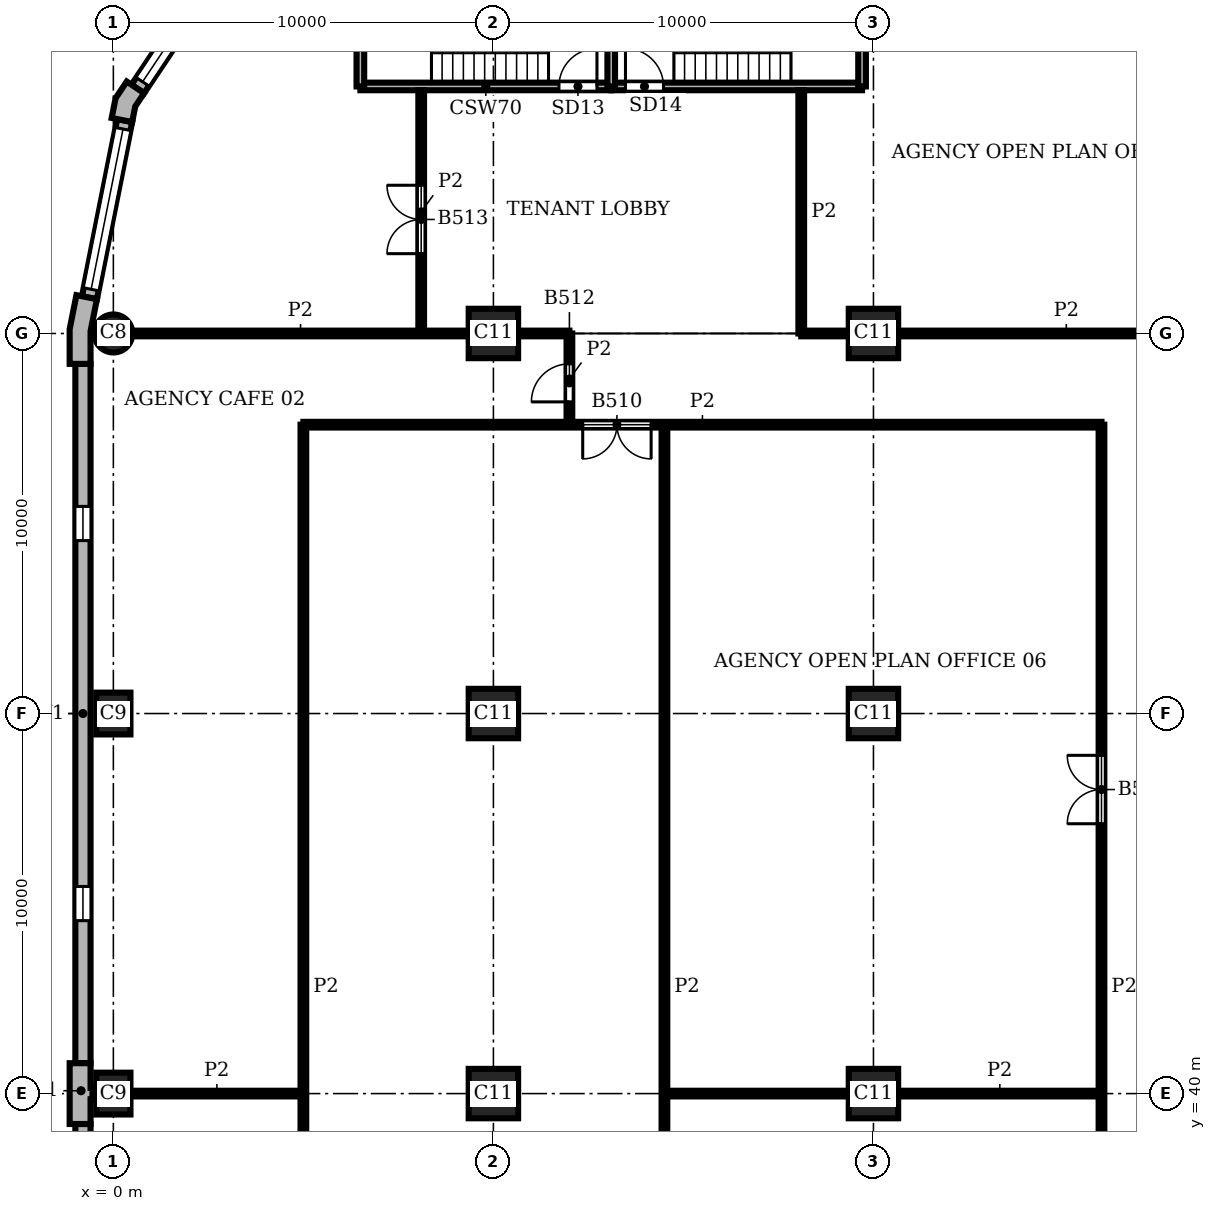
"""IFC4 building model, lengths in metres.
Left out: names, types, materials, properties, quantities, classifications, styles, units other than length and angle.
Written with IfcOpenShell. Run it as: python <this file> out.ifc"""

import sys

from ifc_helpers import new_model, si_unit, direction, frame, frame_2d, origin, origin_2d, place, context, subcontext, project, spatial, polyline, rectangle, circle, outline, extrude, element, fill, save


model = new_model("IFC4")
c1 = context("Model", 3, precision=1e-05, world=origin(), true_north=direction((0.0, 1.0)))
c2 = subcontext(c1, "Body", "Model", "MODEL_VIEW")
j1 = project(units=[si_unit("LENGTHUNIT", "METRE"), si_unit("PLANEANGLEUNIT", "RADIAN")], contexts=[c1])
p1 = place(None, origin())
s1 = spatial("IfcSite", under=j1, at=p1, CompositionType="ELEMENT")
p2 = place(p1, origin())
s2 = spatial("IfcBuilding", under=s1, at=p2, CompositionType="ELEMENT")
p3 = place(p2, frame((0.0, 0.0, 178.5)))
s3 = spatial("IfcBuildingStorey", under=s2, at=p3, CompositionType="ELEMENT", Elevation=178.5)
p4 = place(p3, frame((0.0, 60.0, 0.0), z_axis=(0.0, 0.0, 1.0), x_axis=(1.0, 0.0, 0.0)))
e1 = element("IfcColumn", 1, at=p4, inside=s3, PredefinedType="COLUMN", context=c2, shape_type="SweptSolid", body=[
    extrude(circle(Radius=0.5, at=origin_2d()), origin(), (0.0, 0.0, 1.0), 3.9),
])
for number, where, z_axis, x_axis in (
    (2, (0.0, 50.0, 0.0), (0.0, 0.0, 1.0), (0.0, 1.0, 0.0)),
    (3, (0.0, 40.0, 0.0), (0.0, 0.0, 1.0), (0.0, 1.0, 0.0)),
):
    element("IfcColumn", number, at=place(p3, frame(where, z_axis=z_axis, x_axis=x_axis)), inside=s3, PredefinedType="COLUMN", context=c2, shape_type="SweptSolid", body=[
        extrude(rectangle(XDim=1.1, YDim=0.9, at=origin_2d()), origin(), (0.0, 0.0, 1.0), 3.9),
    ])
for number, where, z_axis, x_axis in (
    (4, (10.0, 40.0, 0.0), (0.0, 0.0, 1.0), (1.0, 0.0, 0.0)),
    (5, (10.0, 50.0, 0.0), (0.0, 0.0, 1.0), (1.0, 0.0, 0.0)),
    (6, (10.0, 60.0, 0.0), (0.0, 0.0, 1.0), (1.0, 0.0, 0.0)),
    (7, (20.0, 40.0, 0.0), (0.0, 0.0, 1.0), (1.0, 0.0, 0.0)),
    (8, (20.0, 50.0, 0.0), (0.0, 0.0, 1.0), (1.0, 0.0, 0.0)),
    (9, (20.0, 60.0, 0.0), (0.0, 0.0, 1.0), (1.0, 0.0, 0.0)),
):
    element("IfcColumn", number, at=place(p3, frame(where, z_axis=z_axis, x_axis=x_axis)), inside=s3, PredefinedType="COLUMN", context=c2, shape_type="SweptSolid", body=[
        extrude(rectangle(XDim=1.3, YDim=1.3, at=origin_2d()), origin(), (0.0, 0.0, 1.0), 3.9),
    ])
p5 = place(p3, origin())
e10 = element("IfcWall", 10, at=p5, inside=s3, PredefinedType="SOLIDWALL", context=c2, shape_type="SweptSolid", body=[
    extrude(outline(polyline([(0.477, 66.545), (0.352, 66.629), (0.059, 66.189), (-0.045, 65.67), (0.103, 65.641), (0.495, 65.563), (0.577, 65.974), (0.81, 66.323), (0.477, 66.545)])), origin(), (0.0, 0.0, 1.0), 3.9),
])
e11 = element("IfcWall", 11, at=p5, inside=s3, PredefinedType="SOLIDWALL", context=c2, shape_type="SweptSolid", body=[
    extrude(outline(polyline([(-0.825, 60.98), (-0.972, 61.009), (-1.15, 60.113), (-1.15, 59.2), (-1.0, 59.2), (-0.6, 59.2), (-0.6, 60.059), (-0.432, 60.902), (-0.825, 60.98)])), origin(), (0.0, 0.0, 1.0), 3.9),
])
e12 = element("IfcWall", 12, at=p5, inside=s3, PredefinedType="SOLIDWALL", context=c2, shape_type="SweptSolid", body=[
    extrude(outline(polyline([(-0.6, 39.2), (-0.6, 39.85), (-0.55, 39.85), (-0.55, 40.15), (-0.6, 40.15), (-0.6, 40.8), (-1.0, 40.8), (-1.15, 40.8), (-1.15, 40.0), (-1.15, 39.2), (-1.0, 39.2), (-0.6, 39.2)])), origin(), (0.0, 0.0, 1.0), 3.9),
])
p6 = place(p3, frame((29.357, 66.434, 0.0), z_axis=(0.0, 0.0, 1.0), x_axis=(-0.555541552266, 0.831488775454, 0.0)))
e13 = element("IfcWall", 13, at=p6, inside=s3, PredefinedType="SOLIDWALL", context=c2, shape_type="SweptSolid", body=[
    extrude(rectangle(XDim=4.753, YDim=0.4, at=frame_2d((2.376, 0.0))), origin(), (0.0, 0.0, 1.0), 3.9),
])
p7 = place(p6, frame((0.226, 0.0, 0.9)))
e14 = element("IfcOpeningElement", 14, at=p7, cuts=e13, PredefinedType="OPENING", context=c2, shape_type="SweptSolid", body=[
    extrude(rectangle(XDim=4.3, YDim=2.35, at=frame_2d((2.15, 1.175))), frame((0.0, 0.21, 0.0), z_axis=(0.0, -1.0, 0.0), x_axis=(1.0, 0.0, 0.0)), (0.0, 0.0, 1.0), 0.42),
])
p8 = place(p3, frame((3.284, 70.386, 0.0), z_axis=(0.0, 0.0, 1.0), x_axis=(-0.555541552266, -0.831488775454, 0.0)))
e15 = element("IfcWall", 15, at=p8, inside=s3, PredefinedType="SOLIDWALL", context=c2, shape_type="SweptSolid", body=[
    extrude(rectangle(XDim=4.753, YDim=0.4, at=frame_2d((2.376, 0.0))), origin(), (0.0, 0.0, 1.0), 3.9),
])
p9 = place(p8, frame((0.226, 0.0, 0.9)))
e16 = element("IfcOpeningElement", 16, at=p9, cuts=e15, PredefinedType="OPENING", context=c2, shape_type="SweptSolid", body=[
    extrude(rectangle(XDim=4.3, YDim=2.35, at=frame_2d((2.15, 1.175))), frame((0.0, 0.21, 0.0), z_axis=(0.0, -1.0, 0.0), x_axis=(1.0, 0.0, 0.0)), (0.0, 0.0, 1.0), 0.42),
])
p10 = place(p3, frame((0.299, 65.602, 0.0), z_axis=(0.0, 0.0, 1.0), x_axis=(-0.195098533057, -0.98078364709, 0.0)))
e17 = element("IfcWall", 17, at=p10, inside=s3, PredefinedType="SOLIDWALL", context=c2, shape_type="SweptSolid", body=[
    extrude(rectangle(XDim=4.753, YDim=0.4, at=frame_2d((2.376, 0.0))), origin(), (0.0, 0.0, 1.0), 3.9),
])
p11 = place(p10, frame((0.226, 0.0, 0.9)))
e18 = element("IfcOpeningElement", 18, at=p11, cuts=e17, PredefinedType="OPENING", context=c2, shape_type="SweptSolid", body=[
    extrude(rectangle(XDim=4.3, YDim=2.35, at=frame_2d((2.15, 1.175))), frame((0.0, 0.21, 0.0), z_axis=(0.0, -1.0, 0.0), x_axis=(1.0, 0.0, 0.0)), (0.0, 0.0, 1.0), 0.42),
])
p12 = place(p3, frame((-0.8, 59.2, 0.0), z_axis=(0.0, 0.0, 1.0), x_axis=(0.0, -1.0, 0.0)))
e19 = element("IfcWall", 19, at=p12, inside=s3, PredefinedType="SOLIDWALL", context=c2, shape_type="SweptSolid", body=[
    extrude(rectangle(XDim=18.4, YDim=0.4, at=frame_2d((9.2, 0.0))), origin(), (0.0, 0.0, 1.0), 3.9),
])
p13 = place(p12, frame((3.75, 0.0, 0.9)))
e20 = element("IfcOpeningElement", 20, at=p13, cuts=e19, PredefinedType="OPENING", context=c2, shape_type="SweptSolid", body=[
    extrude(rectangle(XDim=0.9, YDim=2.35, at=frame_2d((0.45, 1.175))), frame((0.0, 0.21, 0.0), z_axis=(0.0, -1.0, 0.0), x_axis=(1.0, 0.0, 0.0)), (0.0, 0.0, 1.0), 0.42),
])
p14 = place(p12, frame((13.75, 0.0, 0.9)))
e21 = element("IfcOpeningElement", 21, at=p14, cuts=e19, PredefinedType="OPENING", context=c2, shape_type="SweptSolid", body=[
    extrude(rectangle(XDim=0.9, YDim=2.35, at=frame_2d((0.45, 1.175))), frame((0.0, 0.21, 0.0), z_axis=(0.0, -1.0, 0.0), x_axis=(1.0, 0.0, 0.0)), (0.0, 0.0, 1.0), 0.42),
])
p15 = place(p3, frame((-0.8, 39.2, 0.0), z_axis=(0.0, 0.0, 1.0), x_axis=(0.0, -1.0, 0.0)))
e22 = element("IfcWall", 22, at=p15, inside=s3, PredefinedType="SOLIDWALL", context=c2, shape_type="SweptSolid", body=[
    extrude(rectangle(XDim=18.4, YDim=0.4, at=frame_2d((9.2, 0.0))), origin(), (0.0, 0.0, 1.0), 3.9),
])
p16 = place(p15, frame((3.75, 0.0, 0.9)))
e23 = element("IfcOpeningElement", 23, at=p16, cuts=e22, PredefinedType="OPENING", context=c2, shape_type="SweptSolid", body=[
    extrude(rectangle(XDim=0.9, YDim=2.35, at=frame_2d((0.45, 1.175))), frame((0.0, 0.21, 0.0), z_axis=(0.0, -1.0, 0.0), x_axis=(1.0, 0.0, 0.0)), (0.0, 0.0, 1.0), 0.42),
])
p17 = place(p15, frame((13.75, 0.0, 0.9)))
e24 = element("IfcOpeningElement", 24, at=p17, cuts=e22, PredefinedType="OPENING", context=c2, shape_type="SweptSolid", body=[
    extrude(rectangle(XDim=0.9, YDim=2.35, at=frame_2d((0.45, 1.175))), frame((0.0, 0.21, 0.0), z_axis=(0.0, -1.0, 0.0), x_axis=(1.0, 0.0, 0.0)), (0.0, 0.0, 1.0), 0.42),
])
p18 = place(p3, frame((6.5, 66.5, 0.0), z_axis=(0.0, 0.0, 1.0), x_axis=(1.0, 0.0, 0.0)))
e25 = element("IfcWall", 25, at=p18, inside=s3, PredefinedType="SHEAR", context=c2, shape_type="SweptSolid", body=[
    extrude(rectangle(XDim=6.6, YDim=0.2, at=frame_2d((3.3, 0.0))), origin(), (0.0, 0.0, 1.0), 3.58),
])
p19 = place(p18, frame((5.225, 0.0, 0.0)))
e26 = element("IfcOpeningElement", 26, at=p19, cuts=e25, PredefinedType="OPENING", context=c2, shape_type="SweptSolid", body=[
    extrude(rectangle(XDim=1.0, YDim=2.1, at=frame_2d((0.5, 1.05))), frame((0.0, 0.11, 0.0), z_axis=(0.0, -1.0, 0.0), x_axis=(1.0, 0.0, 0.0)), (0.0, 0.0, 1.0), 0.22),
])
p20 = place(p3, frame((13.1, 66.5, 0.0), z_axis=(0.0, 0.0, 1.0), x_axis=(1.0, 0.0, 0.0)))
e27 = element("IfcWall", 27, at=p20, inside=s3, PredefinedType="SHEAR", context=c2, shape_type="SweptSolid", body=[
    extrude(rectangle(XDim=6.6, YDim=0.2, at=frame_2d((3.3, 0.0))), origin(), (0.0, 0.0, 1.0), 3.58),
])
p21 = place(p20, frame((0.375, 0.0, 0.0)))
e28 = element("IfcOpeningElement", 28, at=p21, cuts=e27, PredefinedType="OPENING", context=c2, shape_type="SweptSolid", body=[
    extrude(rectangle(XDim=1.0, YDim=2.1, at=frame_2d((0.5, 1.05))), frame((0.0, 0.11, 0.0), z_axis=(0.0, -1.0, 0.0), x_axis=(1.0, 0.0, 0.0)), (0.0, 0.0, 1.0), 0.22),
])
for number, where, z_axis, x_axis in (
    (29, (6.5, 66.5, 0.0), (0.0, 0.0, 1.0), (0.0, 1.0, 0.0)),
    (30, (13.1, 66.5, 0.0), (0.0, 0.0, 1.0), (0.0, 1.0, 0.0)),
    (31, (19.7, 66.5, 0.0), (0.0, 0.0, 1.0), (0.0, 1.0, 0.0)),
):
    element("IfcWall", number, at=place(p3, frame(where, z_axis=z_axis, x_axis=x_axis)), inside=s3, PredefinedType="SHEAR", context=c2, shape_type="SweptSolid", body=[
        extrude(rectangle(XDim=3.3, YDim=0.2, at=frame_2d((1.65, 0.0))), origin(), (0.0, 0.0, 1.0), 3.58),
    ])
p22 = place(p3, frame((5.0, 28.0, 0.0), z_axis=(0.0, 0.0, 1.0), x_axis=(0.0, 1.0, 0.0)))
e32 = element("IfcWall", 32, at=p22, inside=s3, PredefinedType="PARTITIONING", context=c2, shape_type="SweptSolid", body=[
    extrude(rectangle(XDim=29.6, YDim=0.15, at=frame_2d((14.8, 0.0))), origin(), (0.0, 0.0, 1.0), 3.58),
])
p23 = place(p3, frame((8.1, 60.0, 0.0), z_axis=(0.0, 0.0, 1.0), x_axis=(0.0, 1.0, 0.0)))
e33 = element("IfcWall", 33, at=p23, inside=s3, PredefinedType="PARTITIONING", context=c2, shape_type="SweptSolid", body=[
    extrude(rectangle(XDim=6.4, YDim=0.15, at=frame_2d((3.2, 0.0))), origin(), (0.0, 0.0, 1.0), 3.58),
])
p24 = place(p23, frame((2.1, 0.0, 0.0)))
e34 = element("IfcOpeningElement", 34, at=p24, cuts=e33, PredefinedType="OPENING", context=c2, shape_type="SweptSolid", body=[
    extrude(rectangle(XDim=1.8, YDim=2.1, at=frame_2d((0.9, 1.05))), frame((0.0, 0.085, 0.0), z_axis=(0.0, -1.0, 0.0), x_axis=(1.0, 0.0, 0.0)), (0.0, 0.0, 1.0), 0.17),
])
p25 = place(p3, frame((12.0, 57.6, 0.0), z_axis=(0.0, 0.0, 1.0), x_axis=(0.0, 1.0, 0.0)))
e35 = element("IfcWall", 35, at=p25, inside=s3, PredefinedType="PARTITIONING", context=c2, shape_type="SweptSolid", body=[
    extrude(rectangle(XDim=2.4, YDim=0.15, at=frame_2d((1.2, 0.0))), origin(), (0.0, 0.0, 1.0), 3.58),
])
p26 = place(p25, frame((0.6, 0.0, 0.0)))
e36 = element("IfcOpeningElement", 36, at=p26, cuts=e35, PredefinedType="OPENING", context=c2, shape_type="SweptSolid", body=[
    extrude(rectangle(XDim=1.0, YDim=2.1, at=frame_2d((0.5, 1.05))), frame((0.0, 0.085, 0.0), z_axis=(0.0, -1.0, 0.0), x_axis=(1.0, 0.0, 0.0)), (0.0, 0.0, 1.0), 0.17),
])
p27 = place(p3, frame((14.5, 28.0, 0.0), z_axis=(0.0, 0.0, 1.0), x_axis=(0.0, 1.0, 0.0)))
e37 = element("IfcWall", 37, at=p27, inside=s3, PredefinedType="PARTITIONING", context=c2, shape_type="SweptSolid", body=[
    extrude(rectangle(XDim=29.6, YDim=0.15, at=frame_2d((14.8, 0.0))), origin(), (0.0, 0.0, 1.0), 3.58),
])
p28 = place(p3, frame((18.1, 60.0, 0.0), z_axis=(0.0, 0.0, 1.0), x_axis=(0.0, 1.0, 0.0)))
e38 = element("IfcWall", 38, at=p28, inside=s3, PredefinedType="PARTITIONING", context=c2, shape_type="SweptSolid", body=[
    extrude(rectangle(XDim=6.4, YDim=0.15, at=frame_2d((3.2, 0.0))), origin(), (0.0, 0.0, 1.0), 3.58),
])
p29 = place(p3, frame((26.0, 28.0, 0.0), z_axis=(0.0, 0.0, 1.0), x_axis=(0.0, 1.0, 0.0)))
e39 = element("IfcWall", 39, at=p29, inside=s3, PredefinedType="PARTITIONING", context=c2, shape_type="SweptSolid", body=[
    extrude(rectangle(XDim=29.6, YDim=0.15, at=frame_2d((14.8, 0.0))), origin(), (0.0, 0.0, 1.0), 3.58),
])
p30 = place(p29, frame((6.1, 0.0, 0.0)))
e40 = element("IfcOpeningElement", 40, at=p30, cuts=e39, PredefinedType="OPENING", context=c2, shape_type="SweptSolid", body=[
    extrude(rectangle(XDim=1.0, YDim=2.1, at=frame_2d((0.5, 1.05))), frame((0.0, 0.085, 0.0), z_axis=(0.0, -1.0, 0.0), x_axis=(1.0, 0.0, 0.0)), (0.0, 0.0, 1.0), 0.17),
])
p31 = place(p29, frame((19.1, 0.0, 0.0)))
e41 = element("IfcOpeningElement", 41, at=p31, cuts=e39, PredefinedType="OPENING", context=c2, shape_type="SweptSolid", body=[
    extrude(rectangle(XDim=1.8, YDim=2.1, at=frame_2d((0.9, 1.05))), frame((0.0, 0.085, 0.0), z_axis=(0.0, -1.0, 0.0), x_axis=(1.0, 0.0, 0.0)), (0.0, 0.0, 1.0), 0.17),
])
p32 = place(p3, frame((0.45, 40.0, 0.0), z_axis=(0.0, 0.0, 1.0), x_axis=(1.0, 0.0, 0.0)))
e42 = element("IfcWall", 42, at=p32, inside=s3, PredefinedType="PARTITIONING", context=c2, shape_type="SweptSolid", body=[
    extrude(rectangle(XDim=4.55, YDim=0.15, at=frame_2d((2.275, 0.0))), origin(), (0.0, 0.0, 1.0), 3.58),
])
p33 = place(p3, frame((14.5, 40.0, 0.0), z_axis=(0.0, 0.0, 1.0), x_axis=(1.0, 0.0, 0.0)))
e43 = element("IfcWall", 43, at=p33, inside=s3, PredefinedType="PARTITIONING", context=c2, shape_type="SweptSolid", body=[
    extrude(rectangle(XDim=4.85, YDim=0.15, at=frame_2d((2.425, 0.0))), origin(), (0.0, 0.0, 1.0), 3.58),
])
p34 = place(p3, frame((20.65, 40.0, 0.0), z_axis=(0.0, 0.0, 1.0), x_axis=(1.0, 0.0, 0.0)))
e44 = element("IfcWall", 44, at=p34, inside=s3, PredefinedType="PARTITIONING", context=c2, shape_type="SweptSolid", body=[
    extrude(rectangle(XDim=5.35, YDim=0.15, at=frame_2d((2.675, 0.0))), origin(), (0.0, 0.0, 1.0), 3.58),
])
p35 = place(p3, frame((5.0, 57.6, 0.0), z_axis=(0.0, 0.0, 1.0), x_axis=(1.0, 0.0, 0.0)))
e45 = element("IfcWall", 45, at=p35, inside=s3, PredefinedType="PARTITIONING", context=c2, shape_type="SweptSolid", body=[
    extrude(rectangle(XDim=21.0, YDim=0.15, at=frame_2d((10.5, 0.0))), origin(), (0.0, 0.0, 1.0), 3.58),
])
p36 = place(p35, frame((7.35, 0.0, 0.0)))
e46 = element("IfcOpeningElement", 46, at=p36, cuts=e45, PredefinedType="OPENING", context=c2, shape_type="SweptSolid", body=[
    extrude(rectangle(XDim=1.8, YDim=2.1, at=frame_2d((0.9, 1.05))), frame((0.0, 0.085, 0.0), z_axis=(0.0, -1.0, 0.0), x_axis=(1.0, 0.0, 0.0)), (0.0, 0.0, 1.0), 0.17),
])
p37 = place(p3, frame((0.5, 60.0, 0.0), z_axis=(0.0, 0.0, 1.0), x_axis=(1.0, 0.0, 0.0)))
e47 = element("IfcWall", 47, at=p37, inside=s3, PredefinedType="PARTITIONING", context=c2, shape_type="SweptSolid", body=[
    extrude(rectangle(XDim=8.85, YDim=0.15, at=frame_2d((4.425, 0.0))), origin(), (0.0, 0.0, 1.0), 3.58),
])
p38 = place(p3, frame((10.65, 60.0, 0.0), z_axis=(0.0, 0.0, 1.0), x_axis=(1.0, 0.0, 0.0)))
e48 = element("IfcWall", 48, at=p38, inside=s3, PredefinedType="PARTITIONING", context=c2, shape_type="SweptSolid", body=[
    extrude(rectangle(XDim=1.35, YDim=0.15, at=frame_2d((0.675, 0.0))), origin(), (0.0, 0.0, 1.0), 3.58),
])
p39 = place(p3, frame((18.1, 60.0, 0.0), z_axis=(0.0, 0.0, 1.0), x_axis=(1.0, 0.0, 0.0)))
e49 = element("IfcWall", 49, at=p39, inside=s3, PredefinedType="PARTITIONING", context=c2, shape_type="SweptSolid", body=[
    extrude(rectangle(XDim=1.25, YDim=0.15, at=frame_2d((0.625, 0.0))), origin(), (0.0, 0.0, 1.0), 3.58),
])
p40 = place(p3, frame((20.65, 60.0, 0.0), z_axis=(0.0, 0.0, 1.0), x_axis=(1.0, 0.0, 0.0)))
e50 = element("IfcWall", 50, at=p40, inside=s3, PredefinedType="PARTITIONING", context=c2, shape_type="SweptSolid", body=[
    extrude(rectangle(XDim=8.85, YDim=0.15, at=frame_2d((4.425, 0.0))), origin(), (0.0, 0.0, 1.0), 3.58),
])
p41 = place(p7, origin())
e51 = element("IfcWindow", 51, at=p41, inside=s3, PartitioningType="SINGLE_PANEL", PredefinedType="WINDOW", context=c2, shape_type="SweptSolid", body=[
    extrude(rectangle(XDim=4.3, YDim=2.35, at=frame_2d((2.15, 1.175))), frame((0.0, 0.16, 0.0), z_axis=(0.0, -1.0, 0.0), x_axis=(1.0, 0.0, 0.0)), (0.0, 0.0, 1.0), 0.06),
])
fill(e14, e51)
p42 = place(p9, origin())
e52 = element("IfcWindow", 52, at=p42, inside=s3, PartitioningType="SINGLE_PANEL", PredefinedType="WINDOW", context=c2, shape_type="SweptSolid", body=[
    extrude(rectangle(XDim=4.3, YDim=2.35, at=frame_2d((2.15, 1.175))), frame((0.0, 0.16, 0.0), z_axis=(0.0, -1.0, 0.0), x_axis=(1.0, 0.0, 0.0)), (0.0, 0.0, 1.0), 0.06),
])
fill(e16, e52)
p43 = place(p11, origin())
e53 = element("IfcWindow", 53, at=p43, inside=s3, PartitioningType="SINGLE_PANEL", PredefinedType="WINDOW", context=c2, shape_type="SweptSolid", body=[
    extrude(rectangle(XDim=4.3, YDim=2.35, at=frame_2d((2.15, 1.175))), frame((0.0, 0.16, 0.0), z_axis=(0.0, -1.0, 0.0), x_axis=(1.0, 0.0, 0.0)), (0.0, 0.0, 1.0), 0.06),
])
fill(e18, e53)
p44 = place(p13, origin())
e54 = element("IfcWindow", 54, at=p44, inside=s3, PartitioningType="SINGLE_PANEL", PredefinedType="WINDOW", context=c2, shape_type="SweptSolid", body=[
    extrude(rectangle(XDim=0.9, YDim=2.35, at=frame_2d((0.45, 1.175))), frame((0.0, 0.16, 0.0), z_axis=(0.0, -1.0, 0.0), x_axis=(1.0, 0.0, 0.0)), (0.0, 0.0, 1.0), 0.06),
])
fill(e20, e54)
p45 = place(p14, origin())
e55 = element("IfcWindow", 55, at=p45, inside=s3, PartitioningType="SINGLE_PANEL", PredefinedType="WINDOW", context=c2, shape_type="SweptSolid", body=[
    extrude(rectangle(XDim=0.9, YDim=2.35, at=frame_2d((0.45, 1.175))), frame((0.0, 0.16, 0.0), z_axis=(0.0, -1.0, 0.0), x_axis=(1.0, 0.0, 0.0)), (0.0, 0.0, 1.0), 0.06),
])
fill(e21, e55)
p46 = place(p19, origin())
e56 = element("IfcDoor", 56, at=p46, inside=s3, OperationType="SINGLE_SWING_RIGHT", PredefinedType="DOOR", context=c2, shape_type="SweptSolid", body=[
    extrude(rectangle(XDim=1.0, YDim=2.1, at=frame_2d((0.5, 1.05))), frame((0.0, 0.025, 0.0), z_axis=(0.0, -1.0, 0.0), x_axis=(1.0, 0.0, 0.0)), (0.0, 0.0, 1.0), 0.05),
])
fill(e26, e56)
p47 = place(p21, origin())
e57 = element("IfcDoor", 57, at=p47, inside=s3, OperationType="SINGLE_SWING_LEFT", PredefinedType="DOOR", context=c2, shape_type="SweptSolid", body=[
    extrude(rectangle(XDim=1.0, YDim=2.1, at=frame_2d((0.5, 1.05))), frame((0.0, 0.025, 0.0), z_axis=(0.0, -1.0, 0.0), x_axis=(1.0, 0.0, 0.0)), (0.0, 0.0, 1.0), 0.05),
])
fill(e28, e57)
p48 = place(p31, origin())
e58 = element("IfcDoor", 58, at=p48, inside=s3, OperationType="DOUBLE_DOOR_SINGLE_SWING", PredefinedType="DOOR", context=c2, shape_type="SweptSolid", body=[
    extrude(rectangle(XDim=1.8, YDim=2.1, at=frame_2d((0.9, 1.05))), frame((0.0, 0.025, 0.0), z_axis=(0.0, -1.0, 0.0), x_axis=(1.0, 0.0, 0.0)), (0.0, 0.0, 1.0), 0.05),
])
fill(e41, e58)
p49 = place(p36, frame((1.8, 0.0, 0.0), z_axis=(0.0, 0.0, 1.0), x_axis=(-1.0, 0.0, 0.0)))
e59 = element("IfcDoor", 59, at=p49, inside=s3, OperationType="DOUBLE_DOOR_SINGLE_SWING", PredefinedType="DOOR", context=c2, shape_type="SweptSolid", body=[
    extrude(rectangle(XDim=1.8, YDim=2.1, at=frame_2d((0.9, 1.05))), frame((0.0, 0.025, 0.0), z_axis=(0.0, -1.0, 0.0), x_axis=(1.0, 0.0, 0.0)), (0.0, 0.0, 1.0), 0.05),
])
fill(e46, e59)
p50 = place(p26, origin())
e60 = element("IfcDoor", 60, at=p50, inside=s3, OperationType="SINGLE_SWING_LEFT", PredefinedType="DOOR", context=c2, shape_type="SweptSolid", body=[
    extrude(rectangle(XDim=1.0, YDim=2.1, at=frame_2d((0.5, 1.05))), frame((0.0, 0.025, 0.0), z_axis=(0.0, -1.0, 0.0), x_axis=(1.0, 0.0, 0.0)), (0.0, 0.0, 1.0), 0.05),
])
fill(e36, e60)
p51 = place(p24, origin())
e61 = element("IfcDoor", 61, at=p51, inside=s3, OperationType="DOUBLE_DOOR_SINGLE_SWING", PredefinedType="DOOR", context=c2, shape_type="SweptSolid", body=[
    extrude(rectangle(XDim=1.8, YDim=2.1, at=frame_2d((0.9, 1.05))), frame((0.0, 0.025, 0.0), z_axis=(0.0, -1.0, 0.0), x_axis=(1.0, 0.0, 0.0)), (0.0, 0.0, 1.0), 0.05),
])
fill(e34, e61)
save(model, sys.argv[1])
